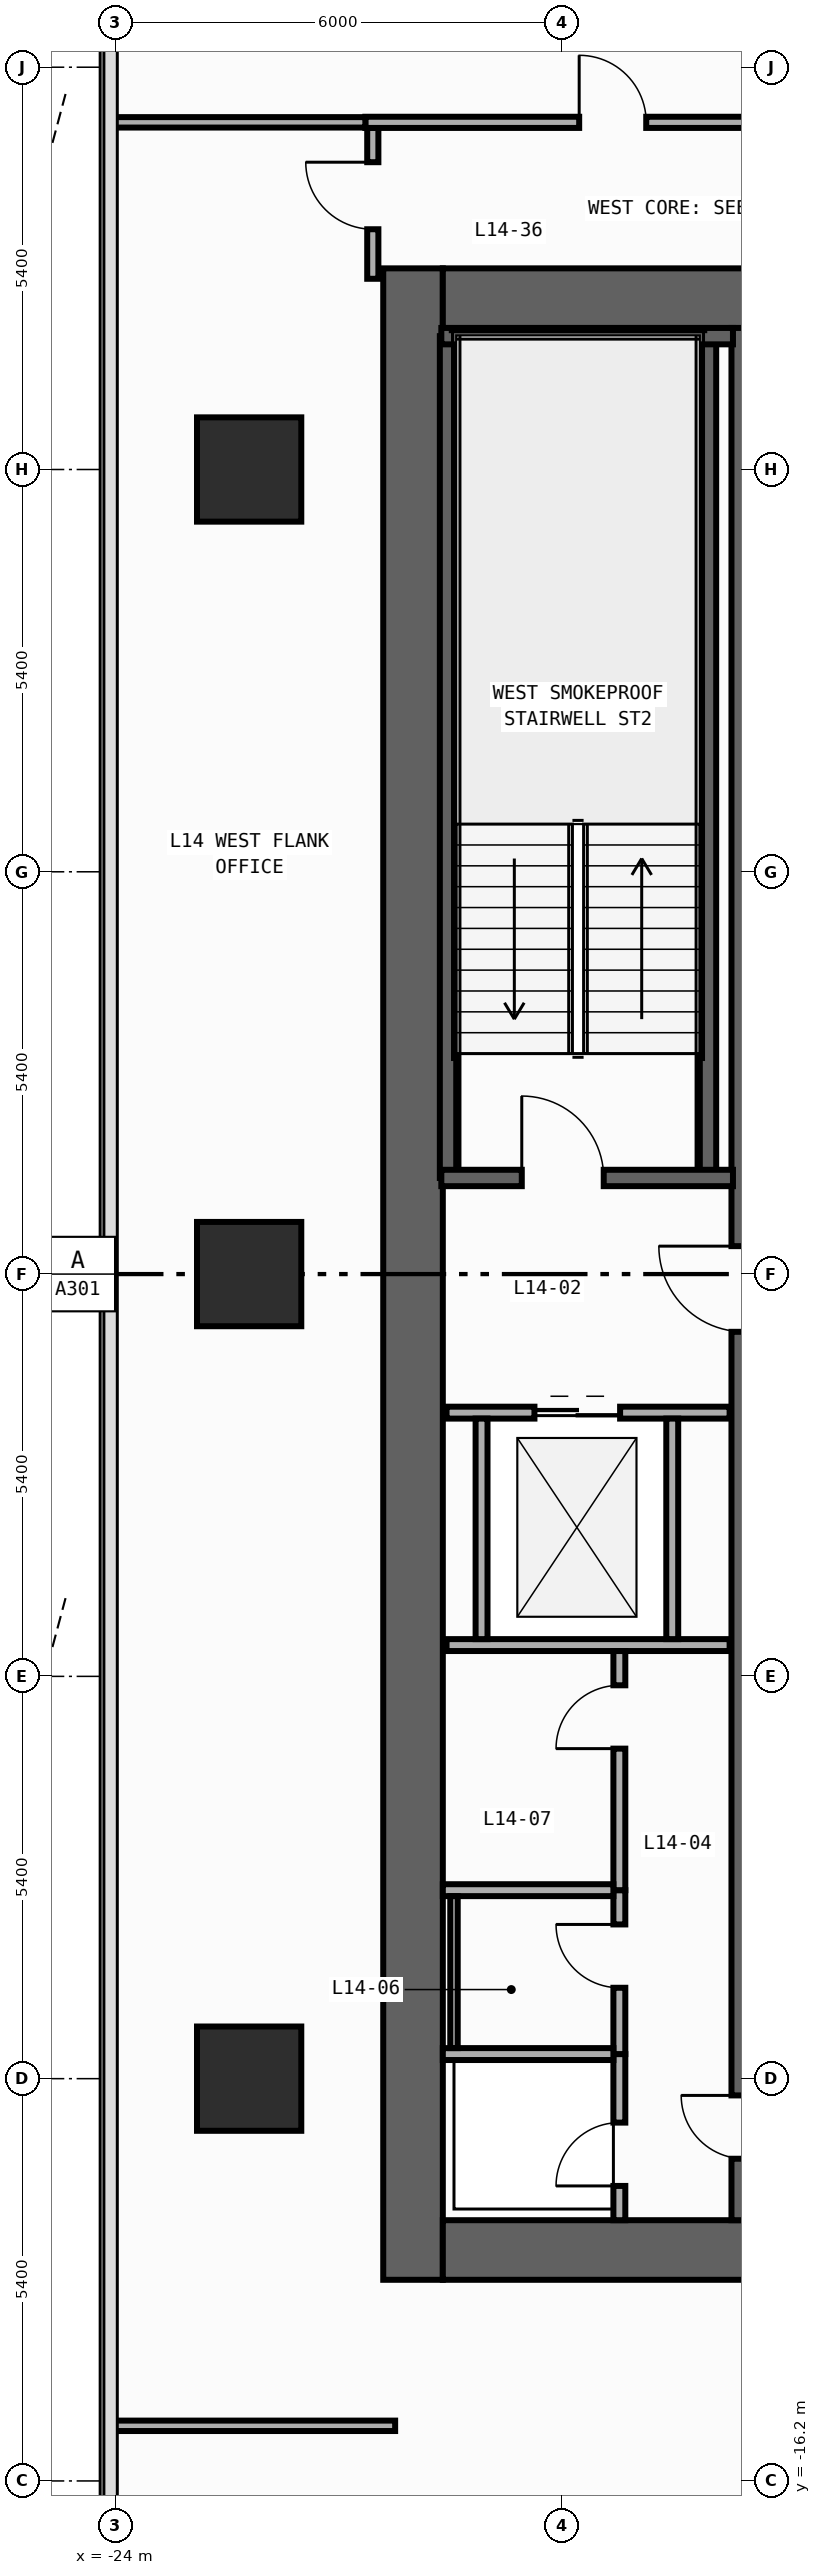
"""IFC4 building model, lengths in metres.
Left out: names, types, materials, properties, quantities, classifications, styles, units other than length and angle.
Written with IfcOpenShell. Run it as: python <this file> out.ifc"""

import sys

from ifc_helpers import new_model, si_unit, direction, frame, frame_2d, origin, origin_2d, place, context, subcontext, project, spatial, rectangle, extrude, element, fill, save


model = new_model("IFC4")
c1 = context("Model", 3, precision=1e-05, world=origin(), true_north=direction((0.0, 1.0)))
c2 = subcontext(c1, "Body", "Model", "MODEL_VIEW")
j1 = project(units=[si_unit("LENGTHUNIT", "METRE"), si_unit("PLANEANGLEUNIT", "RADIAN")], contexts=[c1])
p1 = place(None, origin())
s1 = spatial("IfcSite", under=j1, at=p1, CompositionType="ELEMENT")
p2 = place(p1, origin())
s2 = spatial("IfcBuilding", under=s1, at=p2, CompositionType="ELEMENT")
p3 = place(p2, frame((0.0, 0.0, 59.6)))
s3 = spatial("IfcBuildingStorey", under=s2, at=p3, CompositionType="ELEMENT", Elevation=59.6)
p4 = place(p3, frame((-20.0, -13.5, 0.0), z_axis=(0.0, 0.0, 1.0), x_axis=(0.0, 1.0, 0.0)))
e1 = element("IfcWall", 1, at=p4, inside=s3, PredefinedType="SHEAR", context=c2, shape_type="SweptSolid", body=[
    extrude(rectangle(XDim=27.0, YDim=0.8, at=frame_2d((13.5, 0.0))), origin(), (0.0, 0.0, 1.0), 3.94),
])
for number, where, z_axis, x_axis in (
    (2, (-19.6, -13.1, 0.0), (0.0, 0.0, 1.0), (1.0, 0.0, 0.0)),
    (3, (-19.6, 13.1, 0.0), (0.0, 0.0, 1.0), (1.0, 0.0, 0.0)),
):
    element("IfcWall", number, at=place(p3, frame(where, z_axis=z_axis, x_axis=x_axis)), inside=s3, PredefinedType="SHEAR", context=c2, shape_type="SweptSolid", body=[
        extrude(rectangle(XDim=6.8, YDim=0.8, at=frame_2d((3.4, 0.0))), origin(), (0.0, 0.0, 1.0), 3.94),
    ])
p5 = place(p3, frame((-15.55, -12.7, 0.0), z_axis=(0.0, 0.0, 1.0), x_axis=(0.0, 1.0, 0.0)))
e4 = element("IfcWall", 4, at=p5, inside=s3, PredefinedType="SHEAR", context=c2, shape_type="SweptSolid", body=[
    extrude(rectangle(XDim=25.4, YDim=0.35, at=frame_2d((12.7, 0.0))), origin(), (0.0, 0.0, 1.0), 3.94),
])
p6 = place(p5, frame((11.925, 0.0, 0.0)))
e5 = element("IfcOpeningElement", 5, at=p6, cuts=e4, PredefinedType="OPENING", context=c2, shape_type="SweptSolid", body=[
    extrude(rectangle(XDim=1.15, YDim=2.2, at=frame_2d((0.575, 1.1))), frame((0.0, 0.185, 0.0), z_axis=(0.0, -1.0, 0.0), x_axis=(1.0, 0.0, 0.0)), (0.0, 0.0, 1.0), 0.37),
])
p7 = place(p5, frame((0.825, 0.0, 0.0)))
e6 = element("IfcOpeningElement", 6, at=p7, cuts=e4, PredefinedType="OPENING", context=c2, shape_type="SweptSolid", body=[
    extrude(rectangle(XDim=0.85, YDim=2.1, at=frame_2d((0.425, 1.05))), frame((0.0, 0.185, 0.0), z_axis=(0.0, -1.0, 0.0), x_axis=(1.0, 0.0, 0.0)), (0.0, 0.0, 1.0), 0.37),
])
for number, where, z_axis, x_axis in (
    (7, (-16.04, 1.29, 0.0), (0.0, 0.0, 1.0), (0.0, 1.0, 0.0)),
    (8, (-19.53, 1.29, 0.0), (0.0, 0.0, 1.0), (0.0, 1.0, 0.0)),
):
    element("IfcWall", number, at=place(p3, frame(where, z_axis=z_axis, x_axis=x_axis)), inside=s3, PredefinedType="SHEAR", context=c2, shape_type="SweptSolid", body=[
        extrude(rectangle(XDim=11.3, YDim=0.22, at=frame_2d((5.65, 0.0))), origin(), (0.0, 0.0, 1.0), 3.94),
    ])
p8 = place(p3, frame((-19.62, 12.59, 0.0), z_axis=(0.0, 0.0, 1.0), x_axis=(1.0, 0.0, 0.0)))
e9 = element("IfcWall", 9, at=p8, inside=s3, PredefinedType="SHEAR", context=c2, shape_type="SweptSolid", body=[
    extrude(rectangle(XDim=3.915, YDim=0.22, at=frame_2d((1.958, 0.0))), origin(), (0.0, 0.0, 1.0), 3.94),
])
p9 = place(p3, frame((-19.62, 1.29, 0.0), z_axis=(0.0, 0.0, 1.0), x_axis=(1.0, 0.0, 0.0)))
e10 = element("IfcWall", 10, at=p9, inside=s3, PredefinedType="SHEAR", context=c2, shape_type="SweptSolid", body=[
    extrude(rectangle(XDim=3.915, YDim=0.22, at=frame_2d((1.958, 0.0))), origin(), (0.0, 0.0, 1.0), 3.94),
])
p10 = place(p9, frame((1.08, 0.0, 0.0)))
e11 = element("IfcOpeningElement", 11, at=p10, cuts=e10, PredefinedType="OPENING", context=c2, shape_type="SweptSolid", body=[
    extrude(rectangle(XDim=1.1, YDim=2.2, at=frame_2d((0.55, 1.1))), frame((0.0, 0.12, 0.0), z_axis=(0.0, -1.0, 0.0), x_axis=(1.0, 0.0, 0.0)), (0.0, 0.0, 1.0), 0.24),
])
for number, where, z_axis, x_axis in (
    (12, (-22.2, -10.8, 0.0), (0.0, 0.0, 1.0), (1.0, 0.0, 0.0)),
    (13, (-22.2, 0.0, 0.0), (0.0, 0.0, 1.0), (1.0, 0.0, 0.0)),
    (14, (-22.2, 10.8, 0.0), (0.0, 0.0, 1.0), (1.0, 0.0, 0.0)),
):
    element("IfcColumn", number, at=place(p3, frame(where, z_axis=z_axis, x_axis=x_axis)), inside=s3, PredefinedType="COLUMN", context=c2, shape_type="SweptSolid", body=[
        extrude(rectangle(XDim=1.4, YDim=1.4, at=origin_2d()), origin(), (0.0, 0.0, 1.0), 4.2),
    ])
p11 = place(p3, frame((-19.55, -1.86, 0.0), z_axis=(0.0, 0.0, 1.0), x_axis=(1.0, 0.0, 0.0)))
e15 = element("IfcWall", 15, at=p11, inside=s3, PredefinedType="STANDARD", context=c2, shape_type="SweptSolid", body=[
    extrude(rectangle(XDim=3.8, YDim=0.16, at=frame_2d((1.9, 0.0))), origin(), (0.0, 0.0, 1.0), 3.94),
])
p12 = place(p11, frame((1.18, 0.0, 0.0)))
e16 = element("IfcOpeningElement", 16, at=p12, cuts=e15, PredefinedType="OPENING", context=c2, shape_type="SweptSolid", body=[
    extrude(rectangle(XDim=1.15, YDim=2.2, at=frame_2d((0.575, 1.1))), frame((0.0, 0.09, 0.0), z_axis=(0.0, -1.0, 0.0), x_axis=(1.0, 0.0, 0.0)), (0.0, 0.0, 1.0), 0.18),
])
p13 = place(p3, frame((-19.55, -4.98, 0.0), z_axis=(0.0, 0.0, 1.0), x_axis=(1.0, 0.0, 0.0)))
e17 = element("IfcWall", 17, at=p13, inside=s3, PredefinedType="STANDARD", context=c2, shape_type="SweptSolid", body=[
    extrude(rectangle(XDim=3.8, YDim=0.16, at=frame_2d((1.9, 0.0))), origin(), (0.0, 0.0, 1.0), 3.94),
])
for number, where, z_axis, x_axis in (
    (18, (-19.08, -4.9, 0.0), (0.0, 0.0, 1.0), (0.0, 1.0, 0.0)),
    (19, (-16.52, -4.9, 0.0), (0.0, 0.0, 1.0), (0.0, 1.0, 0.0)),
):
    element("IfcWall", number, at=place(p3, frame(where, z_axis=z_axis, x_axis=x_axis)), inside=s3, PredefinedType="STANDARD", context=c2, shape_type="SweptSolid", body=[
        extrude(rectangle(XDim=2.96, YDim=0.16, at=frame_2d((1.48, 0.0))), origin(), (0.0, 0.0, 1.0), 3.94),
    ])
p14 = place(p3, frame((-17.23, -12.7, 0.0), z_axis=(0.0, 0.0, 1.0), x_axis=(0.0, 1.0, 0.0)))
e20 = element("IfcWall", 20, at=p14, inside=s3, PredefinedType="PARTITIONING", context=c2, shape_type="SweptSolid", body=[
    extrude(rectangle(XDim=2.23, YDim=0.16, at=frame_2d((1.115, 0.0))), origin(), (0.0, 0.0, 1.0), 3.94),
])
p15 = place(p14, frame((0.46, 0.0, 0.0)))
e21 = element("IfcOpeningElement", 21, at=p15, cuts=e20, PredefinedType="OPENING", context=c2, shape_type="SweptSolid", body=[
    extrude(rectangle(XDim=0.85, YDim=2.1, at=frame_2d((0.425, 1.05))), frame((0.0, 0.09, 0.0), z_axis=(0.0, -1.0, 0.0), x_axis=(1.0, 0.0, 0.0)), (0.0, 0.0, 1.0), 0.18),
])
p16 = place(p3, frame((-17.23, -10.47, 0.0), z_axis=(0.0, 0.0, 1.0), x_axis=(0.0, 1.0, 0.0)))
e22 = element("IfcWall", 22, at=p16, inside=s3, PredefinedType="PARTITIONING", context=c2, shape_type="SweptSolid", body=[
    extrude(rectangle(XDim=2.2, YDim=0.16, at=frame_2d((1.1, 0.0))), origin(), (0.0, 0.0, 1.0), 3.94),
])
p17 = place(p16, frame((0.89, 0.0, 0.0)))
e23 = element("IfcOpeningElement", 23, at=p17, cuts=e22, PredefinedType="OPENING", context=c2, shape_type="SweptSolid", body=[
    extrude(rectangle(XDim=0.85, YDim=2.1, at=frame_2d((0.425, 1.05))), frame((0.0, 0.09, 0.0), z_axis=(0.0, -1.0, 0.0), x_axis=(1.0, 0.0, 0.0)), (0.0, 0.0, 1.0), 0.18),
])
p18 = place(p3, frame((-17.23, -8.27, 0.0), z_axis=(0.0, 0.0, 1.0), x_axis=(0.0, 1.0, 0.0)))
e24 = element("IfcWall", 24, at=p18, inside=s3, PredefinedType="PARTITIONING", context=c2, shape_type="SweptSolid", body=[
    extrude(rectangle(XDim=3.21, YDim=0.16, at=frame_2d((1.605, 0.0))), origin(), (0.0, 0.0, 1.0), 3.94),
])
p19 = place(p18, frame((1.9, 0.0, 0.0)))
e25 = element("IfcOpeningElement", 25, at=p19, cuts=e24, PredefinedType="OPENING", context=c2, shape_type="SweptSolid", body=[
    extrude(rectangle(XDim=0.85, YDim=2.1, at=frame_2d((0.425, 1.05))), frame((0.0, 0.09, 0.0), z_axis=(0.0, -1.0, 0.0), x_axis=(1.0, 0.0, 0.0)), (0.0, 0.0, 1.0), 0.18),
])
for number, where, z_axis, x_axis in (
    (26, (-19.6, -10.47, 0.0), (0.0, 0.0, 1.0), (1.0, 0.0, 0.0)),
    (27, (-19.6, -8.27, 0.0), (0.0, 0.0, 1.0), (1.0, 0.0, 0.0)),
):
    element("IfcWall", number, at=place(p3, frame(where, z_axis=z_axis, x_axis=x_axis)), inside=s3, PredefinedType="PARTITIONING", context=c2, shape_type="SweptSolid", body=[
        extrude(rectangle(XDim=2.29, YDim=0.16, at=frame_2d((1.145, 0.0))), origin(), (0.0, 0.0, 1.0), 3.94),
    ])
p20 = place(p3, frame((-20.54, 13.36, 0.0), z_axis=(0.0, 0.0, 1.0), x_axis=(0.0, 1.0, 0.0)))
e28 = element("IfcWall", 28, at=p20, inside=s3, PredefinedType="PARTITIONING", context=c2, shape_type="SweptSolid", body=[
    extrude(rectangle(XDim=2.025, YDim=0.15, at=frame_2d((1.012, 0.0))), origin(), (0.0, 0.0, 1.0), 3.94),
])
p21 = place(p20, frame((0.665, 0.0, 0.0)))
e29 = element("IfcOpeningElement", 29, at=p21, cuts=e28, PredefinedType="OPENING", context=c2, shape_type="SweptSolid", body=[
    extrude(rectangle(XDim=0.9, YDim=2.15, at=frame_2d((0.45, 1.075))), frame((0.0, 0.085, 0.0), z_axis=(0.0, -1.0, 0.0), x_axis=(1.0, 0.0, 0.0)), (0.0, 0.0, 1.0), 0.17),
])
p22 = place(p3, frame((-20.64, 15.46, 0.0), z_axis=(0.0, 0.0, 1.0), x_axis=(1.0, 0.0, 0.0)))
e30 = element("IfcWall", 30, at=p22, inside=s3, PredefinedType="PARTITIONING", context=c2, shape_type="SweptSolid", body=[
    extrude(rectangle(XDim=8.65, YDim=0.15, at=frame_2d((4.325, 0.0))), origin(), (0.0, 0.0, 1.0), 3.94),
])
p23 = place(p22, frame((2.871, 0.0, 0.0)))
e31 = element("IfcOpeningElement", 31, at=p23, cuts=e30, PredefinedType="OPENING", context=c2, shape_type="SweptSolid", body=[
    extrude(rectangle(XDim=0.9, YDim=2.15, at=frame_2d((0.45, 1.075))), frame((0.0, 0.085, 0.0), z_axis=(0.0, -1.0, 0.0), x_axis=(1.0, 0.0, 0.0)), (0.0, 0.0, 1.0), 0.17),
])
p24 = place(p3, frame((-24.055, 15.46, 0.0), z_axis=(0.0, 0.0, 1.0), x_axis=(1.0, 0.0, 0.0)))
e32 = element("IfcWall", 32, at=p24, inside=s3, PredefinedType="PARTITIONING", context=c2, shape_type="SweptSolid", body=[
    extrude(rectangle(XDim=3.415, YDim=0.14, at=frame_2d((1.708, 0.0))), origin(), (0.0, 0.0, 1.0), 3.94),
])
p25 = place(p3, frame((-24.055, -15.46, 0.0), z_axis=(0.0, 0.0, 1.0), x_axis=(1.0, 0.0, 0.0)))
e33 = element("IfcWall", 33, at=p25, inside=s3, PredefinedType="PARTITIONING", context=c2, shape_type="SweptSolid", body=[
    extrude(rectangle(XDim=3.815, YDim=0.14, at=frame_2d((1.907, 0.0))), origin(), (0.0, 0.0, 1.0), 3.94),
])
p26 = place(p3, frame((-19.45, -10.39, 0.0), z_axis=(0.0, 0.0, 1.0), x_axis=(0.0, 1.0, 0.0)))
e34 = element("IfcWall", 34, at=p26, inside=s3, PredefinedType="PARTITIONING", context=c2, shape_type="SweptSolid", body=[
    extrude(rectangle(XDim=2.04, YDim=0.1, at=frame_2d((1.02, 0.0))), origin(), (0.0, 0.0, 1.0), 3.94),
])
p27 = place(p10, origin())
e35 = element("IfcDoor", 35, at=p27, inside=s3, OperationType="SINGLE_SWING_LEFT", PredefinedType="DOOR", context=c2, shape_type="SweptSolid", body=[
    extrude(rectangle(XDim=1.1, YDim=2.2, at=frame_2d((0.55, 1.1))), frame((0.0, 0.025, 0.0), z_axis=(0.0, -1.0, 0.0), x_axis=(1.0, 0.0, 0.0)), (0.0, 0.0, 1.0), 0.05),
])
fill(e11, e35)
p28 = place(p12, origin())
e36 = element("IfcDoor", 36, at=p28, inside=s3, OperationType="DOUBLE_DOOR_SLIDING", PredefinedType="DOOR", context=c2, shape_type="SweptSolid", body=[
    extrude(rectangle(XDim=1.15, YDim=2.2, at=frame_2d((0.575, 1.1))), frame((0.0, 0.025, 0.0), z_axis=(0.0, -1.0, 0.0), x_axis=(1.0, 0.0, 0.0)), (0.0, 0.0, 1.0), 0.05),
])
fill(e16, e36)
p29 = place(p15, origin())
e37 = element("IfcDoor", 37, at=p29, inside=s3, OperationType="SINGLE_SWING_LEFT", PredefinedType="DOOR", context=c2, shape_type="SweptSolid", body=[
    extrude(rectangle(XDim=0.85, YDim=2.1, at=frame_2d((0.425, 1.05))), frame((0.0, 0.025, 0.0), z_axis=(0.0, -1.0, 0.0), x_axis=(1.0, 0.0, 0.0)), (0.0, 0.0, 1.0), 0.05),
])
fill(e21, e37)
p30 = place(p17, origin())
e38 = element("IfcDoor", 38, at=p30, inside=s3, OperationType="SINGLE_SWING_RIGHT", PredefinedType="DOOR", context=c2, shape_type="SweptSolid", body=[
    extrude(rectangle(XDim=0.85, YDim=2.1, at=frame_2d((0.425, 1.05))), frame((0.0, 0.025, 0.0), z_axis=(0.0, -1.0, 0.0), x_axis=(1.0, 0.0, 0.0)), (0.0, 0.0, 1.0), 0.05),
])
fill(e23, e38)
p31 = place(p19, origin())
e39 = element("IfcDoor", 39, at=p31, inside=s3, OperationType="SINGLE_SWING_LEFT", PredefinedType="DOOR", context=c2, shape_type="SweptSolid", body=[
    extrude(rectangle(XDim=0.85, YDim=2.1, at=frame_2d((0.425, 1.05))), frame((0.0, 0.025, 0.0), z_axis=(0.0, -1.0, 0.0), x_axis=(1.0, 0.0, 0.0)), (0.0, 0.0, 1.0), 0.05),
])
fill(e25, e39)
p32 = place(p21, origin())
e40 = element("IfcDoor", 40, at=p32, inside=s3, OperationType="SINGLE_SWING_RIGHT", PredefinedType="DOOR", context=c2, shape_type="SweptSolid", body=[
    extrude(rectangle(XDim=0.9, YDim=2.15, at=frame_2d((0.45, 1.075))), frame((0.0, 0.025, 0.0), z_axis=(0.0, -1.0, 0.0), x_axis=(1.0, 0.0, 0.0)), (0.0, 0.0, 1.0), 0.05),
])
fill(e29, e40)
p33 = place(p23, origin())
e41 = element("IfcDoor", 41, at=p33, inside=s3, OperationType="SINGLE_SWING_LEFT", PredefinedType="DOOR", context=c2, shape_type="SweptSolid", body=[
    extrude(rectangle(XDim=0.9, YDim=2.15, at=frame_2d((0.45, 1.075))), frame((0.0, 0.025, 0.0), z_axis=(0.0, -1.0, 0.0), x_axis=(1.0, 0.0, 0.0)), (0.0, 0.0, 1.0), 0.05),
])
fill(e31, e41)
save(model, sys.argv[1])
